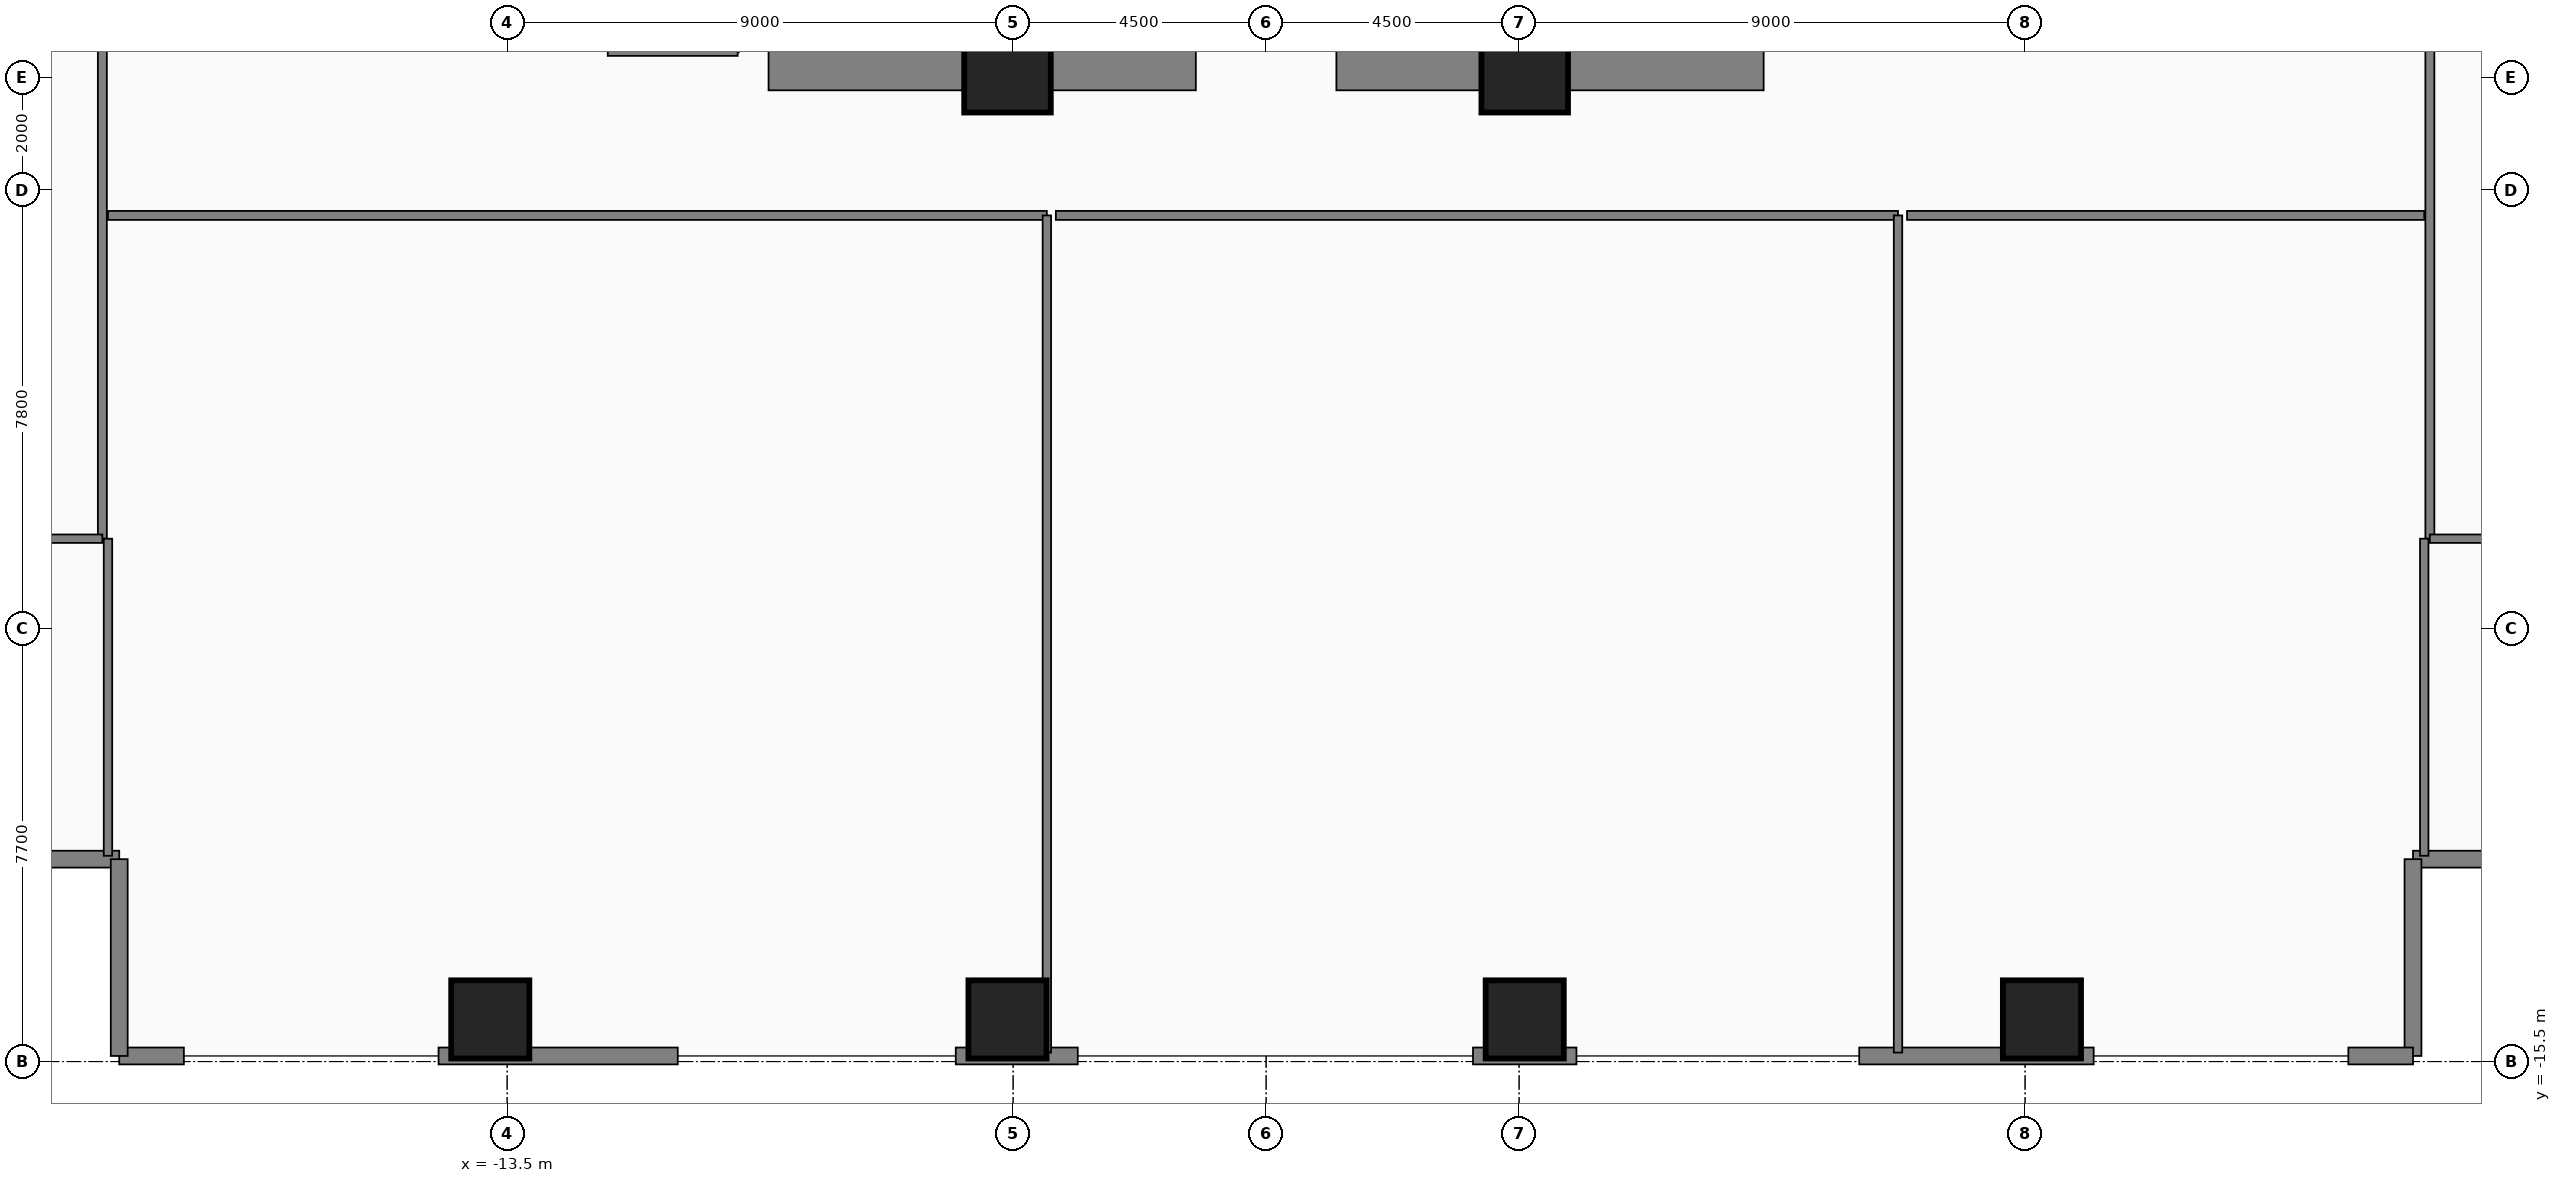
"""IFC4 building model, lengths in metres.
Left out: names, types, materials, properties, quantities, classifications, styles, units other than length and angle.
Written with IfcOpenShell. Run it as: python <this file> out.ifc"""

import sys

from ifc_helpers import new_model, si_unit, direction, frame, frame_2d, origin, origin_2d, place, context, subcontext, project, spatial, rectangle, extrude, element, fill, save


model = new_model("IFC4")
c1 = context("Model", 3, precision=1e-05, world=origin(), true_north=direction((0.0, 1.0)))
c2 = subcontext(c1, "Body", "Model", "MODEL_VIEW")
j1 = project(units=[si_unit("LENGTHUNIT", "METRE"), si_unit("PLANEANGLEUNIT", "RADIAN")], contexts=[c1])
p1 = place(None, origin())
s1 = spatial("IfcSite", under=j1, at=p1, CompositionType="ELEMENT")
p2 = place(p1, origin())
s2 = spatial("IfcBuilding", under=s1, at=p2, CompositionType="ELEMENT")
p3 = place(p2, frame((0.0, 0.0, 154.05)))
s3 = spatial("IfcBuildingStorey", under=s2, at=p3, CompositionType="ELEMENT", Elevation=154.05)
for number, where, z_axis, x_axis in (
    (1, (-8.85, 2.15, 0.0), (0.0, 0.0, 1.0), (1.0, 0.0, 0.0)),
    (2, (1.25, 2.15, 0.0), (0.0, 0.0, 1.0), (1.0, 0.0, 0.0)),
):
    element("IfcWall", number, at=place(p3, frame(where, z_axis=z_axis, x_axis=x_axis)), inside=s3, PredefinedType="SHEAR", context=c2, shape_type="SweptSolid", body=[
        extrude(rectangle(XDim=7.6, YDim=0.75, at=frame_2d((3.8, 0.0))), origin(), (0.0, 0.0, 1.0), 4.28),
    ])
for number, where, z_axis, x_axis in (
    (3, (-4.6, 2.15, 0.0), (0.0, 0.0, 1.0), (1.0, 0.0, 0.0)),
    (4, (4.6, 2.15, 0.0), (0.0, 0.0, 1.0), (1.0, 0.0, 0.0)),
):
    element("IfcColumn", number, at=place(p3, frame(where, z_axis=z_axis, x_axis=x_axis)), inside=s3, PredefinedType="COLUMN", context=c2, shape_type="SweptSolid", body=[
        extrude(rectangle(XDim=1.5, YDim=1.5, at=origin_2d()), origin(), (0.0, 0.0, 1.0), 4.5),
    ])
for number, where, z_axis, x_axis in (
    (5, (-13.8, -14.75, 0.0), (0.0, 0.0, 1.0), (1.0, 0.0, 0.0)),
    (6, (-4.6, -14.75, 0.0), (0.0, 0.0, 1.0), (1.0, 0.0, 0.0)),
    (7, (4.6, -14.75, 0.0), (0.0, 0.0, 1.0), (1.0, 0.0, 0.0)),
    (8, (13.8, -14.75, 0.0), (0.0, 0.0, 1.0), (1.0, 0.0, 0.0)),
):
    element("IfcColumn", number, at=place(p3, frame(where, z_axis=z_axis, x_axis=x_axis)), inside=s3, PredefinedType="COLUMN", context=c2, shape_type="SweptSolid", body=[
        extrude(rectangle(XDim=1.35, YDim=1.35, at=origin_2d()), origin(), (0.0, 0.0, 1.0), 4.5),
    ])
for number, where, z_axis, x_axis in (
    (9, (-20.4, -11.9, 0.0), (0.0, 0.0, 1.0), (-1.0, 0.0, 0.0)),
    (10, (23.9, -11.9, 0.0), (0.0, 0.0, 1.0), (-1.0, 0.0, 0.0)),
    (11, (20.4, -11.9, 0.0), (0.0, 0.0, 1.0), (0.0, -1.0, 0.0)),
):
    element("IfcWall", number, at=place(p3, frame(where, z_axis=z_axis, x_axis=x_axis)), inside=s3, PredefinedType="STANDARD", context=c2, shape_type="SweptSolid", body=[
        extrude(rectangle(XDim=3.5, YDim=0.3, at=frame_2d((1.75, 0.0))), origin(), (0.0, 0.0, 1.0), 4.28),
    ])
p4 = place(p3, frame((20.4, -15.4, 0.0), z_axis=(0.0, 0.0, 1.0), x_axis=(-1.0, 0.0, 0.0)))
e12 = element("IfcWall", 12, at=p4, inside=s3, PredefinedType="STANDARD", context=c2, shape_type="SweptSolid", body=[
    extrude(rectangle(XDim=1.15, YDim=0.3, at=frame_2d((0.575, 0.0))), origin(), (0.0, 0.0, 1.0), 4.28),
])
p5 = place(p3, frame((14.72, -15.4, 0.0), z_axis=(0.0, 0.0, 1.0), x_axis=(-1.0, 0.0, 0.0)))
e13 = element("IfcWall", 13, at=p5, inside=s3, PredefinedType="STANDARD", context=c2, shape_type="SweptSolid", body=[
    extrude(rectangle(XDim=4.17, YDim=0.3, at=frame_2d((2.085, 0.0))), origin(), (0.0, 0.0, 1.0), 4.28),
])
p6 = place(p5, frame((1.915, 0.0, 0.95)))
e14 = element("IfcOpeningElement", 14, at=p6, cuts=e13, PredefinedType="OPENING", context=c2, shape_type="SweptSolid", body=[
    extrude(rectangle(XDim=1.15, YDim=1.55, at=frame_2d((0.575, 0.775))), frame((0.0, 0.16, 0.0), z_axis=(0.0, -1.0, 0.0), x_axis=(1.0, 0.0, 0.0)), (0.0, 0.0, 1.0), 0.32),
])
p7 = place(p3, frame((5.52, -15.4, 0.0), z_axis=(0.0, 0.0, 1.0), x_axis=(-1.0, 0.0, 0.0)))
e15 = element("IfcWall", 15, at=p7, inside=s3, PredefinedType="STANDARD", context=c2, shape_type="SweptSolid", body=[
    extrude(rectangle(XDim=1.84, YDim=0.3, at=frame_2d((0.92, 0.0))), origin(), (0.0, 0.0, 1.0), 4.28),
])
p8 = place(p3, frame((-3.35, -15.4, 0.0), z_axis=(0.0, 0.0, 1.0), x_axis=(-1.0, 0.0, 0.0)))
e16 = element("IfcWall", 16, at=p8, inside=s3, PredefinedType="STANDARD", context=c2, shape_type="SweptSolid", body=[
    extrude(rectangle(XDim=2.17, YDim=0.3, at=frame_2d((1.085, 0.0))), origin(), (0.0, 0.0, 1.0), 4.28),
])
p9 = place(p3, frame((-10.465, -15.4, 0.0), z_axis=(0.0, 0.0, 1.0), x_axis=(-1.0, 0.0, 0.0)))
e17 = element("IfcWall", 17, at=p9, inside=s3, PredefinedType="STANDARD", context=c2, shape_type="SweptSolid", body=[
    extrude(rectangle(XDim=4.255, YDim=0.3, at=frame_2d((2.127, 0.0))), origin(), (0.0, 0.0, 1.0), 4.28),
])
p10 = place(p9, frame((0.65, 0.0, 0.0)))
e18 = element("IfcOpeningElement", 18, at=p10, cuts=e17, PredefinedType="OPENING", context=c2, shape_type="SweptSolid", body=[
    extrude(rectangle(XDim=1.05, YDim=2.2, at=frame_2d((0.525, 1.1))), frame((0.0, 0.16, 0.0), z_axis=(0.0, -1.0, 0.0), x_axis=(1.0, 0.0, 0.0)), (0.0, 0.0, 1.0), 0.32),
])
p11 = place(p3, frame((-19.25, -15.4, 0.0), z_axis=(0.0, 0.0, 1.0), x_axis=(-1.0, 0.0, 0.0)))
e19 = element("IfcWall", 19, at=p11, inside=s3, PredefinedType="STANDARD", context=c2, shape_type="SweptSolid", body=[
    extrude(rectangle(XDim=1.15, YDim=0.3, at=frame_2d((0.575, 0.0))), origin(), (0.0, 0.0, 1.0), 4.28),
])
p12 = place(p3, frame((-20.4, -15.4, 0.0), z_axis=(0.0, 0.0, 1.0), x_axis=(0.0, 1.0, 0.0)))
e20 = element("IfcWall", 20, at=p12, inside=s3, PredefinedType="STANDARD", context=c2, shape_type="SweptSolid", body=[
    extrude(rectangle(XDim=3.5, YDim=0.3, at=frame_2d((1.75, 0.0))), origin(), (0.0, 0.0, 1.0), 4.28),
])
p13 = place(p12, frame((0.22, 0.0, 0.0)))
e21 = element("IfcOpeningElement", 21, at=p13, cuts=e20, PredefinedType="OPENING", context=c2, shape_type="SweptSolid", body=[
    extrude(rectangle(XDim=1.05, YDim=2.2, at=frame_2d((0.525, 1.1))), frame((0.0, 0.16, 0.0), z_axis=(0.0, -1.0, 0.0), x_axis=(1.0, 0.0, 0.0)), (0.0, 0.0, 1.0), 0.32),
])
p14 = place(p3, frame((20.7, -6.2, 0.0), z_axis=(0.0, 0.0, 1.0), x_axis=(0.0, 1.0, 0.0)))
e22 = element("IfcWall", 22, at=p14, inside=s3, PredefinedType="PARTITIONING", context=c2, shape_type="SweptSolid", body=[
    extrude(rectangle(XDim=27.4, YDim=0.16, at=frame_2d((13.7, 0.0))), origin(), (0.0, 0.0, 1.0), 4.28),
])
p15 = place(p14, frame((13.16, 0.0, 0.0)))
e23 = element("IfcOpeningElement", 23, at=p15, cuts=e22, PredefinedType="OPENING", context=c2, shape_type="SweptSolid", body=[
    extrude(rectangle(XDim=1.08, YDim=2.18, at=frame_2d((0.54, 1.09))), frame((0.0, 0.09, 0.0), z_axis=(0.0, -1.0, 0.0), x_axis=(1.0, 0.0, 0.0)), (0.0, 0.0, 1.0), 0.18),
])
p16 = place(p3, frame((-20.7, -6.2, 0.0), z_axis=(0.0, 0.0, 1.0), x_axis=(0.0, 1.0, 0.0)))
e24 = element("IfcWall", 24, at=p16, inside=s3, PredefinedType="PARTITIONING", context=c2, shape_type="SweptSolid", body=[
    extrude(rectangle(XDim=27.4, YDim=0.16, at=frame_2d((13.7, 0.0))), origin(), (0.0, 0.0, 1.0), 4.28),
])
p17 = place(p16, frame((13.16, 0.0, 0.0)))
e25 = element("IfcOpeningElement", 25, at=p17, cuts=e24, PredefinedType="OPENING", context=c2, shape_type="SweptSolid", body=[
    extrude(rectangle(XDim=1.08, YDim=2.18, at=frame_2d((0.54, 1.09))), frame((0.0, 0.09, 0.0), z_axis=(0.0, -1.0, 0.0), x_axis=(1.0, 0.0, 0.0)), (0.0, 0.0, 1.0), 0.18),
])
p18 = place(p3, frame((-20.6, -0.45, 0.0), z_axis=(0.0, 0.0, 1.0), x_axis=(1.0, 0.0, 0.0)))
e26 = element("IfcWall", 26, at=p18, inside=s3, PredefinedType="PARTITIONING", context=c2, shape_type="SweptSolid", body=[
    extrude(rectangle(XDim=16.7, YDim=0.16, at=frame_2d((8.35, 0.0))), origin(), (0.0, 0.0, 1.0), 4.28),
])
p19 = place(p18, frame((8.61, 0.0, 0.0)))
e27 = element("IfcOpeningElement", 27, at=p19, cuts=e26, PredefinedType="OPENING", context=c2, shape_type="SweptSolid", body=[
    extrude(rectangle(XDim=1.08, YDim=2.18, at=frame_2d((0.54, 1.09))), frame((0.0, 0.09, 0.0), z_axis=(0.0, -1.0, 0.0), x_axis=(1.0, 0.0, 0.0)), (0.0, 0.0, 1.0), 0.18),
])
p20 = place(p3, frame((-3.74, -0.45, 0.0), z_axis=(0.0, 0.0, 1.0), x_axis=(1.0, 0.0, 0.0)))
e28 = element("IfcWall", 28, at=p20, inside=s3, PredefinedType="PARTITIONING", context=c2, shape_type="SweptSolid", body=[
    extrude(rectangle(XDim=14.98, YDim=0.16, at=frame_2d((7.49, 0.0))), origin(), (0.0, 0.0, 1.0), 4.28),
])
p21 = place(p20, frame((10.15, 0.0, 0.0)))
e29 = element("IfcOpeningElement", 29, at=p21, cuts=e28, PredefinedType="OPENING", context=c2, shape_type="SweptSolid", body=[
    extrude(rectangle(XDim=1.08, YDim=2.18, at=frame_2d((0.54, 1.09))), frame((0.0, 0.09, 0.0), z_axis=(0.0, -1.0, 0.0), x_axis=(1.0, 0.0, 0.0)), (0.0, 0.0, 1.0), 0.18),
])
p22 = place(p3, frame((11.4, -0.45, 0.0), z_axis=(0.0, 0.0, 1.0), x_axis=(1.0, 0.0, 0.0)))
e30 = element("IfcWall", 30, at=p22, inside=s3, PredefinedType="PARTITIONING", context=c2, shape_type="SweptSolid", body=[
    extrude(rectangle(XDim=9.2, YDim=0.16, at=frame_2d((4.6, 0.0))), origin(), (0.0, 0.0, 1.0), 4.28),
])
p23 = place(p22, frame((4.06, 0.0, 0.0)))
e31 = element("IfcOpeningElement", 31, at=p23, cuts=e30, PredefinedType="OPENING", context=c2, shape_type="SweptSolid", body=[
    extrude(rectangle(XDim=1.08, YDim=2.18, at=frame_2d((0.54, 1.09))), frame((0.0, 0.09, 0.0), z_axis=(0.0, -1.0, 0.0), x_axis=(1.0, 0.0, 0.0)), (0.0, 0.0, 1.0), 0.18),
])
p24 = place(p3, frame((-11.71, 2.47, 0.0), z_axis=(0.0, 0.0, 1.0), x_axis=(1.0, 0.0, 0.0)))
e32 = element("IfcWall", 32, at=p24, inside=s3, PredefinedType="PARTITIONING", context=c2, shape_type="SweptSolid", body=[
    extrude(rectangle(XDim=2.31, YDim=0.165, at=frame_2d((1.155, 0.0))), origin(), (0.0, 0.0, 1.0), 2.88),
])
for number, where, z_axis, x_axis in (
    (33, (20.7, -6.2, 0.0), (0.0, 0.0, 1.0), (1.0, 0.0, 0.0)),
    (34, (-23.84, -6.2, 0.0), (0.0, 0.0, 1.0), (1.0, 0.0, 0.0)),
):
    element("IfcWall", number, at=place(p3, frame(where, z_axis=z_axis, x_axis=x_axis)), inside=s3, PredefinedType="PARTITIONING", context=c2, shape_type="SweptSolid", body=[
        extrude(rectangle(XDim=3.14, YDim=0.15, at=frame_2d((1.57, 0.0))), origin(), (0.0, 0.0, 1.0), 4.28),
    ])
p25 = place(p3, frame((-20.6, -11.84, 0.0), z_axis=(0.0, 0.0, 1.0), x_axis=(0.0, 1.0, 0.0)))
e35 = element("IfcWall", 35, at=p25, inside=s3, PredefinedType="PARTITIONING", context=c2, shape_type="SweptSolid", body=[
    extrude(rectangle(XDim=5.64, YDim=0.15, at=frame_2d((2.82, 0.0))), origin(), (0.0, 0.0, 1.0), 4.28),
])
for number, where, z_axis, x_axis in (
    (36, (-3.9, -15.34, 0.0), (0.0, 0.0, 1.0), (0.0, 1.0, 0.0)),
    (37, (11.24, -15.34, 0.0), (0.0, 0.0, 1.0), (0.0, 1.0, 0.0)),
):
    element("IfcWall", number, at=place(p3, frame(where, z_axis=z_axis, x_axis=x_axis)), inside=s3, PredefinedType="PARTITIONING", context=c2, shape_type="SweptSolid", body=[
        extrude(rectangle(XDim=14.89, YDim=0.15, at=frame_2d((7.445, 0.0))), origin(), (0.0, 0.0, 1.0), 4.28),
    ])
p26 = place(p3, frame((20.6, -11.84, 0.0), z_axis=(0.0, 0.0, 1.0), x_axis=(0.0, 1.0, 0.0)))
e38 = element("IfcWall", 38, at=p26, inside=s3, PredefinedType="PARTITIONING", context=c2, shape_type="SweptSolid", body=[
    extrude(rectangle(XDim=5.64, YDim=0.15, at=frame_2d((2.82, 0.0))), origin(), (0.0, 0.0, 1.0), 4.28),
])
p27 = place(p6, origin())
e39 = element("IfcWindow", 39, at=p27, inside=s3, PartitioningType="SINGLE_PANEL", PredefinedType="WINDOW", context=c2, shape_type="SweptSolid", body=[
    extrude(rectangle(XDim=1.15, YDim=1.55, at=frame_2d((0.575, 0.775))), frame((0.0, 0.03, 0.0), z_axis=(0.0, -1.0, 0.0), x_axis=(1.0, 0.0, 0.0)), (0.0, 0.0, 1.0), 0.06),
])
fill(e14, e39)
p28 = place(p10, origin())
e40 = element("IfcDoor", 40, at=p28, inside=s3, OperationType="SINGLE_SWING_RIGHT", PredefinedType="DOOR", context=c2, shape_type="SweptSolid", body=[
    extrude(rectangle(XDim=1.05, YDim=2.2, at=frame_2d((0.525, 1.1))), frame((0.0, 0.025, 0.0), z_axis=(0.0, -1.0, 0.0), x_axis=(1.0, 0.0, 0.0)), (0.0, 0.0, 1.0), 0.05),
])
fill(e18, e40)
p29 = place(p13, origin())
e41 = element("IfcDoor", 41, at=p29, inside=s3, OperationType="SINGLE_SWING_LEFT", PredefinedType="DOOR", context=c2, shape_type="SweptSolid", body=[
    extrude(rectangle(XDim=1.05, YDim=2.2, at=frame_2d((0.525, 1.1))), frame((0.0, 0.025, 0.0), z_axis=(0.0, -1.0, 0.0), x_axis=(1.0, 0.0, 0.0)), (0.0, 0.0, 1.0), 0.05),
])
fill(e21, e41)
p30 = place(p19, origin())
e42 = element("IfcDoor", 42, at=p30, inside=s3, OperationType="SINGLE_SWING_LEFT", PredefinedType="DOOR", context=c2, shape_type="SweptSolid", body=[
    extrude(rectangle(XDim=1.08, YDim=2.18, at=frame_2d((0.54, 1.09))), frame((0.0, 0.025, 0.0), z_axis=(0.0, -1.0, 0.0), x_axis=(1.0, 0.0, 0.0)), (0.0, 0.0, 1.0), 0.05),
])
fill(e27, e42)
p31 = place(p21, origin())
e43 = element("IfcDoor", 43, at=p31, inside=s3, OperationType="SINGLE_SWING_RIGHT", PredefinedType="DOOR", context=c2, shape_type="SweptSolid", body=[
    extrude(rectangle(XDim=1.08, YDim=2.18, at=frame_2d((0.54, 1.09))), frame((0.0, 0.025, 0.0), z_axis=(0.0, -1.0, 0.0), x_axis=(1.0, 0.0, 0.0)), (0.0, 0.0, 1.0), 0.05),
])
fill(e29, e43)
p32 = place(p23, origin())
e44 = element("IfcDoor", 44, at=p32, inside=s3, OperationType="SINGLE_SWING_LEFT", PredefinedType="DOOR", context=c2, shape_type="SweptSolid", body=[
    extrude(rectangle(XDim=1.08, YDim=2.18, at=frame_2d((0.54, 1.09))), frame((0.0, 0.025, 0.0), z_axis=(0.0, -1.0, 0.0), x_axis=(1.0, 0.0, 0.0)), (0.0, 0.0, 1.0), 0.05),
])
fill(e31, e44)
save(model, sys.argv[1])
